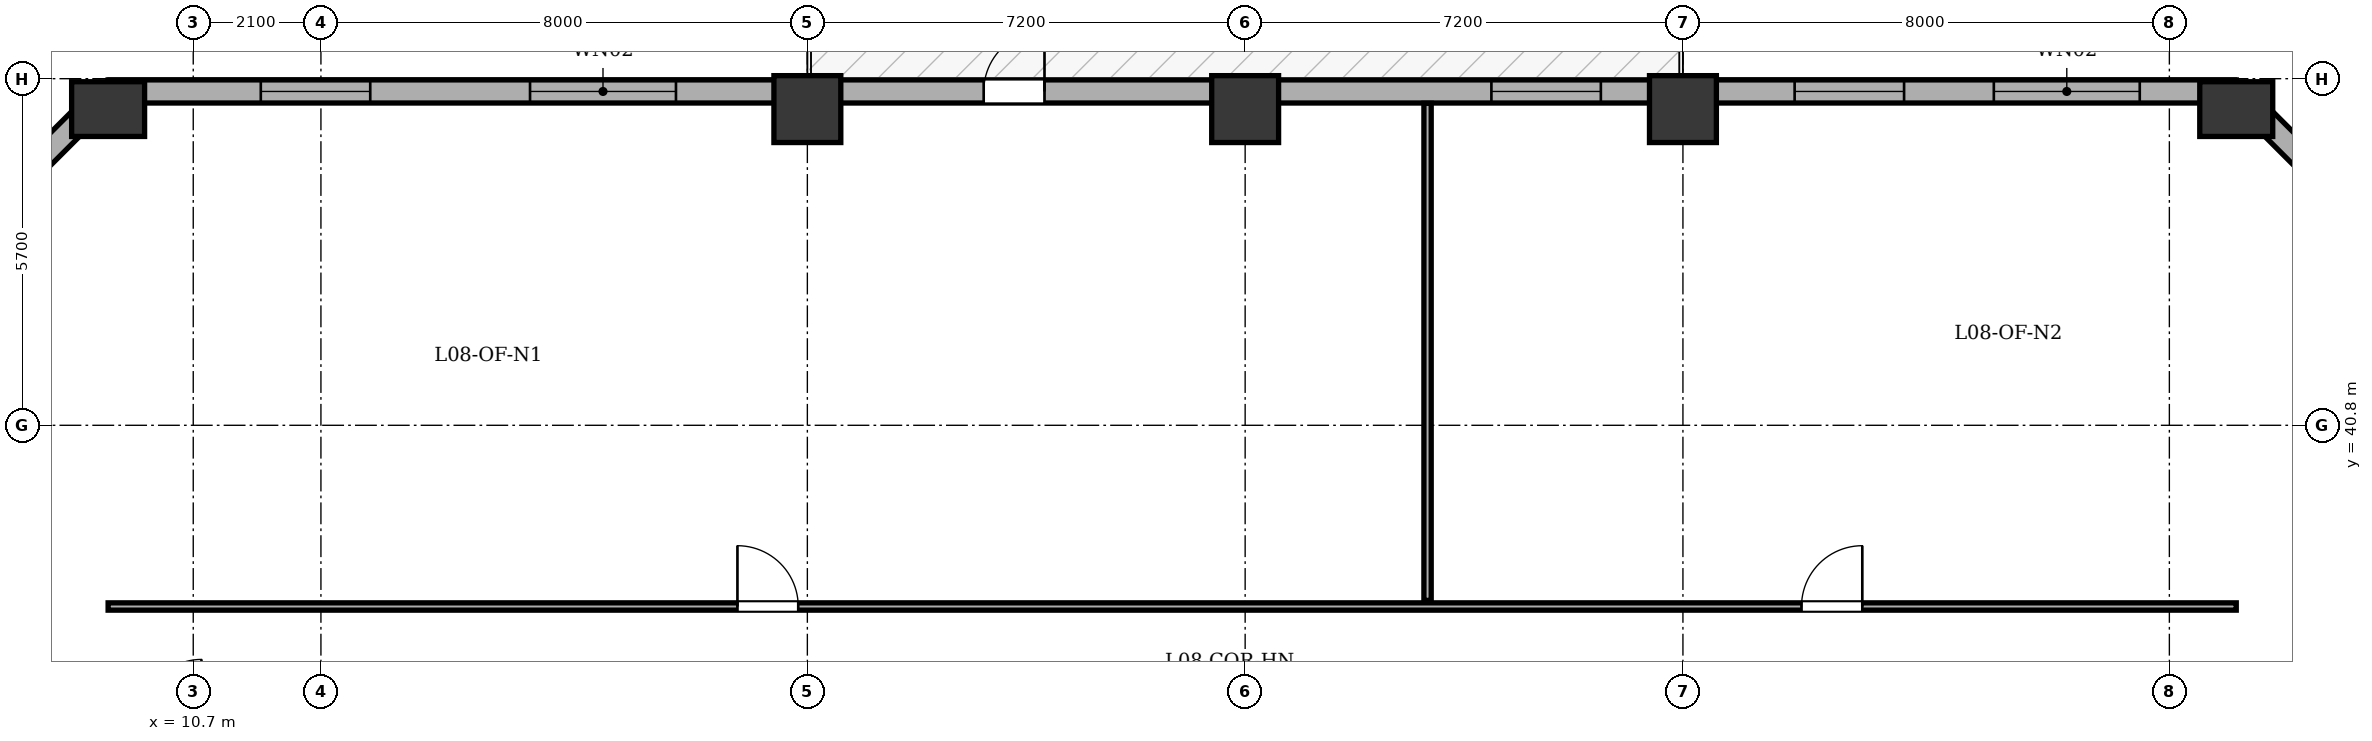
"""IFC4 building model, lengths in metres.
Left out: names, types, materials, properties, quantities, classifications, styles, units other than length and angle.
Written with IfcOpenShell. Run it as: python <this file> out.ifc"""

import sys

from ifc_helpers import new_model, si_unit, direction, frame, frame_2d, origin, origin_2d, place, context, subcontext, project, spatial, rectangle, extrude, element, fill, save


model = new_model("IFC4")
c1 = context("Model", 3, precision=1e-05, world=origin(), true_north=direction((0.0, 1.0)))
c2 = subcontext(c1, "Body", "Model", "MODEL_VIEW")
j1 = project(units=[si_unit("LENGTHUNIT", "METRE"), si_unit("PLANEANGLEUNIT", "RADIAN")], contexts=[c1])
p1 = place(None, origin())
s1 = spatial("IfcSite", under=j1, at=p1, CompositionType="ELEMENT")
p2 = place(p1, origin())
s2 = spatial("IfcBuilding", under=s1, at=p2, CompositionType="ELEMENT")
p3 = place(p2, frame((0.0, 0.0, 36.0)))
s3 = spatial("IfcBuildingStorey", under=s2, at=p3, CompositionType="ELEMENT", Elevation=36.0)
p4 = place(p3, frame((9.3, 46.0, 0.0), z_axis=(0.0, 0.0, 1.0), x_axis=(1.0, 0.0, 0.0)))
e1 = element("IfcColumn", 1, at=p4, inside=s3, PredefinedType="COLUMN", context=c2, shape_type="SweptSolid", body=[
    extrude(rectangle(XDim=0.9, YDim=1.2, at=origin_2d()), origin(), (0.0, 0.0, 1.0), 3.9),
])
for number, where, z_axis, x_axis in (
    (2, (20.8, 46.0, 0.0), (0.0, 0.0, 1.0), (1.0, 0.0, 0.0)),
    (3, (28.0, 46.0, 0.0), (0.0, 0.0, 1.0), (1.0, 0.0, 0.0)),
    (4, (35.2, 46.0, 0.0), (0.0, 0.0, 1.0), (1.0, 0.0, 0.0)),
):
    element("IfcColumn", number, at=place(p3, frame(where, z_axis=z_axis, x_axis=x_axis)), inside=s3, PredefinedType="COLUMN", context=c2, shape_type="SweptSolid", body=[
        extrude(rectangle(XDim=1.1, YDim=1.1, at=origin_2d()), origin(), (0.0, 0.0, 1.0), 3.9),
    ])
p5 = place(p3, frame((44.3, 46.0, 0.0), z_axis=(0.0, 0.0, 1.0), x_axis=(1.0, 0.0, 0.0)))
e5 = element("IfcColumn", 5, at=p5, inside=s3, PredefinedType="COLUMN", context=c2, shape_type="SweptSolid", body=[
    extrude(rectangle(XDim=0.9, YDim=1.2, at=origin_2d()), origin(), (0.0, 0.0, 1.0), 3.9),
])
p6 = place(p3, frame((4.51, 41.5, 0.0), z_axis=(0.0, 0.0, 1.0), x_axis=(0.707106781187, 0.707106781187, 0.0)))
e6 = element("IfcWall", 6, at=p6, inside=s3, PredefinedType="STANDARD", context=c2, shape_type="SweptSolid", body=[
    extrude(rectangle(XDim=6.774, YDim=0.38, at=frame_2d((3.387, 0.0))), origin(), (0.0, 0.0, 1.0), 3.135),
])
p7 = place(p6, frame((2.687, 0.0, 0.8)))
e7 = element("IfcOpeningElement", 7, at=p7, cuts=e6, PredefinedType="OPENING", context=c2, shape_type="SweptSolid", body=[
    extrude(rectangle(XDim=1.4, YDim=1.65, at=frame_2d((0.7, 0.825))), frame((0.0, 0.2, 0.0), z_axis=(0.0, -1.0, 0.0), x_axis=(1.0, 0.0, 0.0)), (0.0, 0.0, 1.0), 0.4),
])
p8 = place(p3, frame((9.3, 46.29, 0.0), z_axis=(0.0, 0.0, 1.0), x_axis=(1.0, 0.0, 0.0)))
e8 = element("IfcWall", 8, at=p8, inside=s3, PredefinedType="STANDARD", context=c2, shape_type="SweptSolid", body=[
    extrude(rectangle(XDim=35.0, YDim=0.38, at=frame_2d((17.5, 0.0))), origin(), (0.0, 0.0, 1.0), 3.135),
])
p9 = place(p8, frame((14.4, 0.0, 0.0)))
e9 = element("IfcOpeningElement", 9, at=p9, cuts=e8, PredefinedType="OPENING", context=c2, shape_type="SweptSolid", body=[
    extrude(rectangle(XDim=1.0, YDim=2.02, at=frame_2d((0.5, 1.01))), frame((0.0, 0.2, 0.0), z_axis=(0.0, -1.0, 0.0), x_axis=(1.0, 0.0, 0.0)), (0.0, 0.0, 1.0), 0.4),
])
p10 = place(p8, frame((2.511, 0.0, 0.8)))
e10 = element("IfcOpeningElement", 10, at=p10, cuts=e8, PredefinedType="OPENING", context=c2, shape_type="SweptSolid", body=[
    extrude(rectangle(XDim=1.8, YDim=1.9, at=frame_2d((0.9, 0.95))), frame((0.0, 0.2, 0.0), z_axis=(0.0, -1.0, 0.0), x_axis=(1.0, 0.0, 0.0)), (0.0, 0.0, 1.0), 0.4),
])
p11 = place(p8, frame((6.939, 0.0, 0.8)))
e11 = element("IfcOpeningElement", 11, at=p11, cuts=e8, PredefinedType="OPENING", context=c2, shape_type="SweptSolid", body=[
    extrude(rectangle(XDim=2.4, YDim=1.9, at=frame_2d((1.2, 0.95))), frame((0.0, 0.2, 0.0), z_axis=(0.0, -1.0, 0.0), x_axis=(1.0, 0.0, 0.0)), (0.0, 0.0, 1.0), 0.4),
])
p12 = place(p8, frame((22.75, 0.0, 0.8)))
e12 = element("IfcOpeningElement", 12, at=p12, cuts=e8, PredefinedType="OPENING", context=c2, shape_type="SweptSolid", body=[
    extrude(rectangle(XDim=1.8, YDim=1.9, at=frame_2d((0.9, 0.95))), frame((0.0, 0.2, 0.0), z_axis=(0.0, -1.0, 0.0), x_axis=(1.0, 0.0, 0.0)), (0.0, 0.0, 1.0), 0.4),
])
p13 = place(p8, frame((27.737, 0.0, 0.8)))
e13 = element("IfcOpeningElement", 13, at=p13, cuts=e8, PredefinedType="OPENING", context=c2, shape_type="SweptSolid", body=[
    extrude(rectangle(XDim=1.8, YDim=1.9, at=frame_2d((0.9, 0.95))), frame((0.0, 0.2, 0.0), z_axis=(0.0, -1.0, 0.0), x_axis=(1.0, 0.0, 0.0)), (0.0, 0.0, 1.0), 0.4),
])
p14 = place(p8, frame((31.013, 0.0, 0.8)))
e14 = element("IfcOpeningElement", 14, at=p14, cuts=e8, PredefinedType="OPENING", context=c2, shape_type="SweptSolid", body=[
    extrude(rectangle(XDim=2.4, YDim=1.9, at=frame_2d((1.2, 0.95))), frame((0.0, 0.2, 0.0), z_axis=(0.0, -1.0, 0.0), x_axis=(1.0, 0.0, 0.0)), (0.0, 0.0, 1.0), 0.4),
])
p15 = place(p3, frame((44.3, 46.29, 0.0), z_axis=(0.0, 0.0, 1.0), x_axis=(0.707106781187, -0.707106781187, 0.0)))
e15 = element("IfcWall", 15, at=p15, inside=s3, PredefinedType="STANDARD", context=c2, shape_type="SweptSolid", body=[
    extrude(rectangle(XDim=6.774, YDim=0.38, at=frame_2d((3.387, 0.0))), origin(), (0.0, 0.0, 1.0), 3.135),
])
p16 = place(p15, frame((2.687, 0.0, 0.8)))
e16 = element("IfcOpeningElement", 16, at=p16, cuts=e15, PredefinedType="OPENING", context=c2, shape_type="SweptSolid", body=[
    extrude(rectangle(XDim=1.4, YDim=1.65, at=frame_2d((0.7, 0.825))), frame((0.0, 0.2, 0.0), z_axis=(0.0, -1.0, 0.0), x_axis=(1.0, 0.0, 0.0)), (0.0, 0.0, 1.0), 0.4),
])
p17 = place(p3, frame((9.3, 37.82, 0.0), z_axis=(0.0, 0.0, 1.0), x_axis=(1.0, 0.0, 0.0)))
e17 = element("IfcWall", 17, at=p17, inside=s3, PredefinedType="PARTITIONING", context=c2, shape_type="SweptSolid", body=[
    extrude(rectangle(XDim=35.0, YDim=0.12, at=frame_2d((17.5, 0.0))), origin(), (0.0, 0.0, 1.0), 3.6),
])
p18 = place(p17, frame((10.35, 0.0, 0.0)))
e18 = element("IfcOpeningElement", 18, at=p18, cuts=e17, PredefinedType="OPENING", context=c2, shape_type="SweptSolid", body=[
    extrude(rectangle(XDim=1.0, YDim=2.1, at=frame_2d((0.5, 1.05))), frame((0.0, 0.07, 0.0), z_axis=(0.0, -1.0, 0.0), x_axis=(1.0, 0.0, 0.0)), (0.0, 0.0, 1.0), 0.14),
])
p19 = place(p17, frame((27.85, 0.0, 0.0)))
e19 = element("IfcOpeningElement", 19, at=p19, cuts=e17, PredefinedType="OPENING", context=c2, shape_type="SweptSolid", body=[
    extrude(rectangle(XDim=1.0, YDim=2.1, at=frame_2d((0.5, 1.05))), frame((0.0, 0.07, 0.0), z_axis=(0.0, -1.0, 0.0), x_axis=(1.0, 0.0, 0.0)), (0.0, 0.0, 1.0), 0.14),
])
p20 = place(p3, frame((31.0, 37.92, 0.0), z_axis=(0.0, 0.0, 1.0), x_axis=(0.0, 1.0, 0.0)))
e20 = element("IfcWall", 20, at=p20, inside=s3, PredefinedType="PARTITIONING", context=c2, shape_type="SweptSolid", body=[
    extrude(rectangle(XDim=8.175, YDim=0.12, at=frame_2d((4.087, 0.0))), origin(), (0.0, 0.0, 1.0), 3.6),
])
p21 = place(p9, origin())
e21 = element("IfcDoor", 21, at=p21, inside=s3, OperationType="SINGLE_SWING_RIGHT", PredefinedType="DOOR", context=c2, shape_type="SweptSolid", body=[
    extrude(rectangle(XDim=1.0, YDim=2.02, at=frame_2d((0.5, 1.01))), frame((0.0, 0.025, 0.0), z_axis=(0.0, -1.0, 0.0), x_axis=(1.0, 0.0, 0.0)), (0.0, 0.0, 1.0), 0.05),
])
fill(e9, e21)
p22 = place(p10, origin())
e22 = element("IfcWindow", 22, at=p22, inside=s3, PartitioningType="SINGLE_PANEL", PredefinedType="WINDOW", context=c2, shape_type="SweptSolid", body=[
    extrude(rectangle(XDim=1.8, YDim=1.9, at=frame_2d((0.9, 0.95))), frame((0.0, -0.01, 0.0), z_axis=(0.0, -1.0, 0.0), x_axis=(1.0, 0.0, 0.0)), (0.0, 0.0, 1.0), 0.06),
])
fill(e10, e22)
p23 = place(p11, origin())
e23 = element("IfcWindow", 23, at=p23, inside=s3, PartitioningType="SINGLE_PANEL", PredefinedType="WINDOW", context=c2, shape_type="SweptSolid", body=[
    extrude(rectangle(XDim=2.4, YDim=1.9, at=frame_2d((1.2, 0.95))), frame((0.0, -0.01, 0.0), z_axis=(0.0, -1.0, 0.0), x_axis=(1.0, 0.0, 0.0)), (0.0, 0.0, 1.0), 0.06),
])
fill(e11, e23)
p24 = place(p12, origin())
e24 = element("IfcWindow", 24, at=p24, inside=s3, PartitioningType="SINGLE_PANEL", PredefinedType="WINDOW", context=c2, shape_type="SweptSolid", body=[
    extrude(rectangle(XDim=1.8, YDim=1.9, at=frame_2d((0.9, 0.95))), frame((0.0, -0.01, 0.0), z_axis=(0.0, -1.0, 0.0), x_axis=(1.0, 0.0, 0.0)), (0.0, 0.0, 1.0), 0.06),
])
fill(e12, e24)
p25 = place(p13, origin())
e25 = element("IfcWindow", 25, at=p25, inside=s3, PartitioningType="SINGLE_PANEL", PredefinedType="WINDOW", context=c2, shape_type="SweptSolid", body=[
    extrude(rectangle(XDim=1.8, YDim=1.9, at=frame_2d((0.9, 0.95))), frame((0.0, -0.01, 0.0), z_axis=(0.0, -1.0, 0.0), x_axis=(1.0, 0.0, 0.0)), (0.0, 0.0, 1.0), 0.06),
])
fill(e13, e25)
p26 = place(p14, origin())
e26 = element("IfcWindow", 26, at=p26, inside=s3, PartitioningType="SINGLE_PANEL", PredefinedType="WINDOW", context=c2, shape_type="SweptSolid", body=[
    extrude(rectangle(XDim=2.4, YDim=1.9, at=frame_2d((1.2, 0.95))), frame((0.0, -0.01, 0.0), z_axis=(0.0, -1.0, 0.0), x_axis=(1.0, 0.0, 0.0)), (0.0, 0.0, 1.0), 0.06),
])
fill(e14, e26)
p27 = place(p18, origin())
e27 = element("IfcDoor", 27, at=p27, inside=s3, OperationType="SINGLE_SWING_LEFT", PredefinedType="DOOR", context=c2, shape_type="SweptSolid", body=[
    extrude(rectangle(XDim=1.0, YDim=2.1, at=frame_2d((0.5, 1.05))), frame((0.0, 0.025, 0.0), z_axis=(0.0, -1.0, 0.0), x_axis=(1.0, 0.0, 0.0)), (0.0, 0.0, 1.0), 0.05),
])
fill(e18, e27)
p28 = place(p19, origin())
e28 = element("IfcDoor", 28, at=p28, inside=s3, OperationType="SINGLE_SWING_RIGHT", PredefinedType="DOOR", context=c2, shape_type="SweptSolid", body=[
    extrude(rectangle(XDim=1.0, YDim=2.1, at=frame_2d((0.5, 1.05))), frame((0.0, 0.025, 0.0), z_axis=(0.0, -1.0, 0.0), x_axis=(1.0, 0.0, 0.0)), (0.0, 0.0, 1.0), 0.05),
])
fill(e19, e28)
save(model, sys.argv[1])
